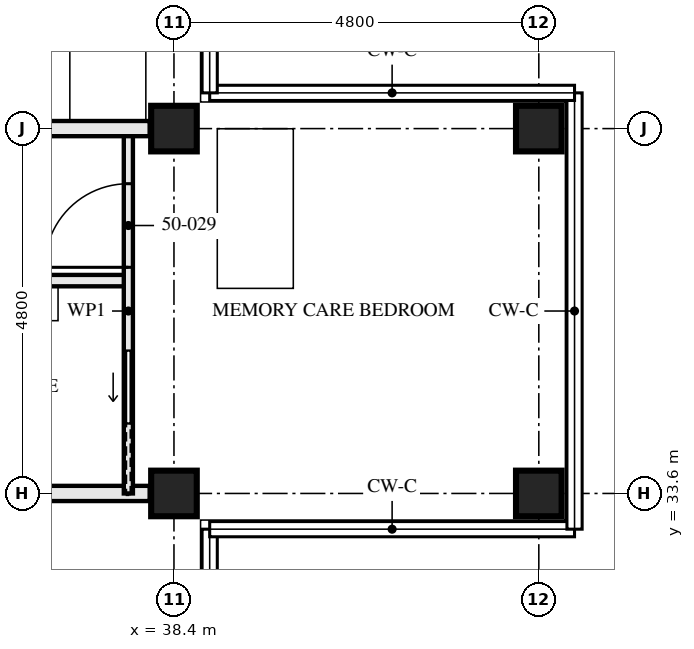
"""IFC4 building model, lengths in metres.
Left out: names, types, materials, properties, quantities, classifications, styles, units other than length and angle.
Written with IfcOpenShell. Run it as: python <this file> out.ifc"""

import sys

from ifc_helpers import new_model, si_unit, direction, frame, frame_2d, origin, origin_2d, place, context, subcontext, project, spatial, rectangle, hollow_rectangle, extrude, element, fill, save


model = new_model("IFC4")
c1 = context("Model", 3, precision=1e-05, world=origin(), true_north=direction((0.0, 1.0)))
c2 = subcontext(c1, "Body", "Model", "MODEL_VIEW")
j1 = project(units=[si_unit("LENGTHUNIT", "METRE"), si_unit("PLANEANGLEUNIT", "RADIAN")], contexts=[c1])
p1 = place(None, origin())
s1 = spatial("IfcSite", under=j1, at=p1, CompositionType="ELEMENT")
p2 = place(p1, origin())
s2 = spatial("IfcBuilding", under=s1, at=p2, CompositionType="ELEMENT")
p3 = place(p2, frame((0.0, 0.0, 183.0)))
s3 = spatial("IfcBuildingStorey", under=s2, at=p3, CompositionType="ELEMENT", Elevation=183.0)
for number, where, z_axis, x_axis in (
    (1, (38.4, 33.6, 0.0), (0.0, 0.0, 1.0), (0.0, 1.0, 0.0)),
    (2, (38.4, 38.4, 0.0), (0.0, 0.0, 1.0), (0.0, 1.0, 0.0)),
    (3, (43.2, 33.6, 0.0), (0.0, 0.0, 1.0), (0.0, 1.0, 0.0)),
    (4, (43.2, 38.4, 0.0), (0.0, 0.0, 1.0), (0.0, 1.0, 0.0)),
):
    element("IfcColumn", number, at=place(p3, frame(where, z_axis=z_axis, x_axis=x_axis)), inside=s3, PredefinedType="COLUMN", context=c2, shape_type="SweptSolid", body=[
        extrude(hollow_rectangle(XDim=0.6, YDim=0.6, WallThickness=0.08, at=origin_2d()), origin(), (0.0, 0.0, 1.0), 3.5),
    ])
p4 = place(p3, frame((38.08, 33.6, 0.0), z_axis=(0.0, 0.0, 1.0), x_axis=(-1.0, 0.0, 0.0)))
e5 = element("IfcWall", 5, at=p4, inside=s3, PredefinedType="PARTITIONING", context=c2, shape_type="SweptSolid", body=[
    extrude(rectangle(XDim=7.28, YDim=0.2, at=frame_2d((3.64, 0.0))), origin(), (0.0, 0.0, 1.0), 2.55),
])
p5 = place(p3, frame((37.8, 36.4, 0.0), z_axis=(0.0, 0.0, 1.0), x_axis=(-1.0, 0.0, 0.0)))
e6 = element("IfcWall", 6, at=p5, inside=s3, PredefinedType="PARTITIONING", context=c2, shape_type="SweptSolid", body=[
    extrude(rectangle(XDim=3.0, YDim=0.15, at=frame_2d((1.5, 0.0))), origin(), (0.0, 0.0, 1.0), 3.33),
])
p6 = place(p3, frame((37.8, 33.6, 0.0), z_axis=(0.0, 0.0, 1.0), x_axis=(0.0, 1.0, 0.0)))
e7 = element("IfcWall", 7, at=p6, inside=s3, PredefinedType="PARTITIONING", context=c2, shape_type="SweptSolid", body=[
    extrude(rectangle(XDim=4.8, YDim=0.12, at=frame_2d((2.4, 0.0))), origin(), (0.0, 0.0, 1.0), 3.33),
])
p7 = place(p6, frame((2.975, 0.0, 0.0)))
e8 = element("IfcOpeningElement", 8, at=p7, cuts=e7, PredefinedType="OPENING", context=c2, shape_type="SweptSolid", body=[
    extrude(rectangle(XDim=1.1, YDim=2.1, at=frame_2d((0.55, 1.05))), frame((0.0, 0.071, 0.0), z_axis=(0.0, -1.0, 0.0), x_axis=(1.0, 0.0, 0.0)), (0.0, 0.0, 1.0), 0.141),
])
p8 = place(p6, frame((0.925, 0.0, 0.0)))
e9 = element("IfcOpeningElement", 9, at=p8, cuts=e7, PredefinedType="OPENING", context=c2, shape_type="SweptSolid", body=[
    extrude(rectangle(XDim=0.95, YDim=2.1, at=frame_2d((0.475, 1.05))), frame((0.0, 0.071, 0.0), z_axis=(0.0, -1.0, 0.0), x_axis=(1.0, 0.0, 0.0)), (0.0, 0.0, 1.0), 0.141),
])
p9 = place(p3, frame((38.08, 38.4, 0.0), z_axis=(0.0, 0.0, 1.0), x_axis=(-1.0, 0.0, 0.0)))
e10 = element("IfcWall", 10, at=p9, inside=s3, PredefinedType="PARTITIONING", context=c2, shape_type="SweptSolid", body=[
    extrude(rectangle(XDim=7.28, YDim=0.2, at=frame_2d((3.64, 0.0))), origin(), (0.0, 0.0, 1.0), 2.55),
])
p10 = place(p7, origin())
e11 = element("IfcDoor", 11, at=p10, inside=s3, OperationType="SINGLE_SWING_RIGHT", PredefinedType="DOOR", context=c2, shape_type="SweptSolid", body=[
    extrude(rectangle(XDim=1.1, YDim=2.1, at=frame_2d((0.55, 1.05))), frame((0.0, 0.022, 0.0), z_axis=(0.0, -1.0, 0.0), x_axis=(1.0, 0.0, 0.0)), (0.0, 0.0, 1.0), 0.044),
])
fill(e8, e11)
p11 = place(p8, origin())
e12 = element("IfcDoor", 12, at=p11, inside=s3, OperationType="SLIDING_TO_RIGHT", PredefinedType="DOOR", context=c2, shape_type="SweptSolid", body=[
    extrude(rectangle(XDim=0.95, YDim=2.1, at=frame_2d((0.475, 1.05))), frame((0.0, 0.022, 0.0), z_axis=(0.0, -1.0, 0.0), x_axis=(1.0, 0.0, 0.0)), (0.0, 0.0, 1.0), 0.044),
])
fill(e9, e12)
save(model, sys.argv[1])
